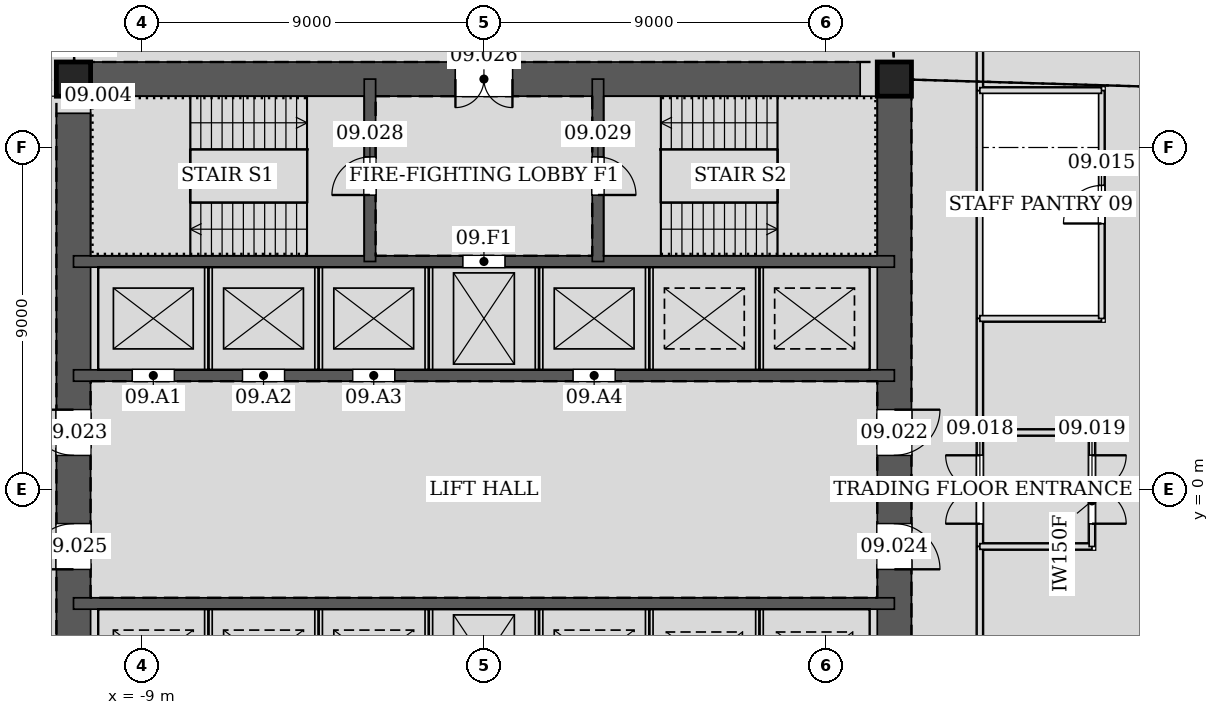
"""IFC4 building model, lengths in metres.
Left out: names, types, materials, properties, quantities, classifications, styles, units other than length and angle.
Written with IfcOpenShell. Run it as: python <this file> out.ifc"""

import sys

from ifc_helpers import new_model, si_unit, direction, frame, frame_2d, origin, origin_2d, place, context, subcontext, project, spatial, rectangle, hollow_rectangle, extrude, element, fill, save


model = new_model("IFC4")
c1 = context("Model", 3, precision=1e-05, world=origin(), true_north=direction((0.0, 1.0)))
c2 = subcontext(c1, "Body", "Model", "MODEL_VIEW")
j1 = project(units=[si_unit("LENGTHUNIT", "METRE"), si_unit("PLANEANGLEUNIT", "RADIAN")], contexts=[c1])
p1 = place(None, origin())
s1 = spatial("IfcSite", under=j1, at=p1, CompositionType="ELEMENT")
p2 = place(p1, origin())
s2 = spatial("IfcBuilding", under=s1, at=p2, CompositionType="ELEMENT")
p3 = place(p2, frame((0.0, 0.0, 45.6)))
s3 = spatial("IfcBuildingStorey", under=s2, at=p3, CompositionType="ELEMENT", Elevation=45.6)
for number, where, z_axis, x_axis in (
    (1, (10.8, 10.8, 0.0), (0.0, 0.0, 1.0), (1.0, 0.0, 0.0)),
    (2, (-10.8, 10.8, 0.0), (0.0, 0.0, 1.0), (1.0, 0.0, 0.0)),
):
    element("IfcColumn", number, at=place(p3, frame(where, z_axis=z_axis, x_axis=x_axis)), inside=s3, PredefinedType="COLUMN", context=c2, shape_type="SweptSolid", body=[
        extrude(hollow_rectangle(XDim=0.9, YDim=0.9, WallThickness=0.06, at=origin_2d()), origin(), (0.0, 0.0, 1.0), 4.2),
    ])
p4 = place(p3, frame((10.8, -10.8, 0.0), z_axis=(0.0, 0.0, 1.0), x_axis=(0.0, 1.0, 0.0)))
e3 = element("IfcWall", 3, at=p4, inside=s3, PredefinedType="SOLIDWALL", context=c2, shape_type="SweptSolid", body=[
    extrude(rectangle(XDim=21.6, YDim=0.9, at=frame_2d((10.8, 0.0))), origin(), (0.0, 0.0, 1.0), 4.2),
])
p5 = place(p4, frame((11.7, 0.0, 0.0)))
e4 = element("IfcOpeningElement", 4, at=p5, cuts=e3, PredefinedType="OPENING", context=c2, shape_type="SweptSolid", body=[
    extrude(rectangle(XDim=1.2, YDim=2.1, at=frame_2d((0.6, 1.05))), frame((0.0, 0.46, 0.0), z_axis=(0.0, -1.0, 0.0), x_axis=(1.0, 0.0, 0.0)), (0.0, 0.0, 1.0), 0.92),
])
p6 = place(p4, frame((8.7, 0.0, 0.0)))
e5 = element("IfcOpeningElement", 5, at=p6, cuts=e3, PredefinedType="OPENING", context=c2, shape_type="SweptSolid", body=[
    extrude(rectangle(XDim=1.2, YDim=2.1, at=frame_2d((0.6, 1.05))), frame((0.0, 0.46, 0.0), z_axis=(0.0, -1.0, 0.0), x_axis=(1.0, 0.0, 0.0)), (0.0, 0.0, 1.0), 0.92),
])
p7 = place(p3, frame((10.8, 10.8, 0.0), z_axis=(0.0, 0.0, 1.0), x_axis=(-1.0, 0.0, 0.0)))
e6 = element("IfcWall", 6, at=p7, inside=s3, PredefinedType="SOLIDWALL", context=c2, shape_type="SweptSolid", body=[
    extrude(rectangle(XDim=21.6, YDim=0.9, at=frame_2d((10.8, 0.0))), origin(), (0.0, 0.0, 1.0), 4.2),
])
p8 = place(p7, frame((10.05, 0.0, 0.0)))
e7 = element("IfcOpeningElement", 7, at=p8, cuts=e6, PredefinedType="OPENING", context=c2, shape_type="SweptSolid", body=[
    extrude(rectangle(XDim=1.5, YDim=2.1, at=frame_2d((0.75, 1.05))), frame((0.0, 0.46, 0.0), z_axis=(0.0, -1.0, 0.0), x_axis=(1.0, 0.0, 0.0)), (0.0, 0.0, 1.0), 0.92),
])
p9 = place(p3, frame((-10.8, 10.8, 0.0), z_axis=(0.0, 0.0, 1.0), x_axis=(0.0, -1.0, 0.0)))
e8 = element("IfcWall", 8, at=p9, inside=s3, PredefinedType="SOLIDWALL", context=c2, shape_type="SweptSolid", body=[
    extrude(rectangle(XDim=21.6, YDim=0.9, at=frame_2d((10.8, 0.0))), origin(), (0.0, 0.0, 1.0), 4.2),
])
p10 = place(p9, frame((8.7, 0.0, 0.0)))
e9 = element("IfcOpeningElement", 9, at=p10, cuts=e8, PredefinedType="OPENING", context=c2, shape_type="SweptSolid", body=[
    extrude(rectangle(XDim=1.2, YDim=2.1, at=frame_2d((0.6, 1.05))), frame((0.0, 0.46, 0.0), z_axis=(0.0, -1.0, 0.0), x_axis=(1.0, 0.0, 0.0)), (0.0, 0.0, 1.0), 0.92),
])
p11 = place(p9, frame((11.7, 0.0, 0.0)))
e10 = element("IfcOpeningElement", 10, at=p11, cuts=e8, PredefinedType="OPENING", context=c2, shape_type="SweptSolid", body=[
    extrude(rectangle(XDim=1.2, YDim=2.1, at=frame_2d((0.6, 1.05))), frame((0.0, 0.46, 0.0), z_axis=(0.0, -1.0, 0.0), x_axis=(1.0, 0.0, 0.0)), (0.0, 0.0, 1.0), 0.92),
])
p12 = place(p3, frame((-10.8, 3.0, 0.0), z_axis=(0.0, 0.0, 1.0), x_axis=(1.0, 0.0, 0.0)))
e11 = element("IfcWall", 11, at=p12, inside=s3, PredefinedType="SOLIDWALL", context=c2, shape_type="SweptSolid", body=[
    extrude(rectangle(XDim=21.6, YDim=0.3, at=frame_2d((10.8, 0.0))), origin(), (0.0, 0.0, 1.0), 4.2),
])
p13 = place(p12, frame((1.55, 0.0, 0.0)))
e12 = element("IfcOpeningElement", 12, at=p13, cuts=e11, PredefinedType="OPENING", context=c2, shape_type="SweptSolid", body=[
    extrude(rectangle(XDim=1.1, YDim=2.1, at=frame_2d((0.55, 1.05))), frame((0.0, 0.16, 0.0), z_axis=(0.0, -1.0, 0.0), x_axis=(1.0, 0.0, 0.0)), (0.0, 0.0, 1.0), 0.32),
])
p14 = place(p12, frame((4.45, 0.0, 0.0)))
e13 = element("IfcOpeningElement", 13, at=p14, cuts=e11, PredefinedType="OPENING", context=c2, shape_type="SweptSolid", body=[
    extrude(rectangle(XDim=1.1, YDim=2.1, at=frame_2d((0.55, 1.05))), frame((0.0, 0.16, 0.0), z_axis=(0.0, -1.0, 0.0), x_axis=(1.0, 0.0, 0.0)), (0.0, 0.0, 1.0), 0.32),
])
p15 = place(p12, frame((7.35, 0.0, 0.0)))
e14 = element("IfcOpeningElement", 14, at=p15, cuts=e11, PredefinedType="OPENING", context=c2, shape_type="SweptSolid", body=[
    extrude(rectangle(XDim=1.1, YDim=2.1, at=frame_2d((0.55, 1.05))), frame((0.0, 0.16, 0.0), z_axis=(0.0, -1.0, 0.0), x_axis=(1.0, 0.0, 0.0)), (0.0, 0.0, 1.0), 0.32),
])
p16 = place(p12, frame((13.15, 0.0, 0.0)))
e15 = element("IfcOpeningElement", 15, at=p16, cuts=e11, PredefinedType="OPENING", context=c2, shape_type="SweptSolid", body=[
    extrude(rectangle(XDim=1.1, YDim=2.1, at=frame_2d((0.55, 1.05))), frame((0.0, 0.16, 0.0), z_axis=(0.0, -1.0, 0.0), x_axis=(1.0, 0.0, 0.0)), (0.0, 0.0, 1.0), 0.32),
])
p17 = place(p3, frame((-10.8, 6.0, 0.0), z_axis=(0.0, 0.0, 1.0), x_axis=(1.0, 0.0, 0.0)))
e16 = element("IfcWall", 16, at=p17, inside=s3, PredefinedType="SOLIDWALL", context=c2, shape_type="SweptSolid", body=[
    extrude(rectangle(XDim=21.6, YDim=0.3, at=frame_2d((10.8, 0.0))), origin(), (0.0, 0.0, 1.0), 4.2),
])
p18 = place(p17, frame((10.25, 0.0, 0.0)))
e17 = element("IfcOpeningElement", 17, at=p18, cuts=e16, PredefinedType="OPENING", context=c2, shape_type="SweptSolid", body=[
    extrude(rectangle(XDim=1.1, YDim=2.1, at=frame_2d((0.55, 1.05))), frame((0.0, 0.16, 0.0), z_axis=(0.0, -1.0, 0.0), x_axis=(1.0, 0.0, 0.0)), (0.0, 0.0, 1.0), 0.32),
])
p19 = place(p3, frame((-3.0, 6.0, 0.0), z_axis=(0.0, 0.0, 1.0), x_axis=(0.0, 1.0, 0.0)))
e18 = element("IfcWall", 18, at=p19, inside=s3, PredefinedType="SOLIDWALL", context=c2, shape_type="SweptSolid", body=[
    extrude(rectangle(XDim=4.8, YDim=0.3, at=frame_2d((2.4, 0.0))), origin(), (0.0, 0.0, 1.0), 4.2),
])
p20 = place(p19, frame((1.75, 0.0, 0.0)))
e19 = element("IfcOpeningElement", 19, at=p20, cuts=e18, PredefinedType="OPENING", context=c2, shape_type="SweptSolid", body=[
    extrude(rectangle(XDim=1.0, YDim=2.1, at=frame_2d((0.5, 1.05))), frame((0.0, 0.16, 0.0), z_axis=(0.0, -1.0, 0.0), x_axis=(1.0, 0.0, 0.0)), (0.0, 0.0, 1.0), 0.32),
])
p21 = place(p3, frame((3.0, 6.0, 0.0), z_axis=(0.0, 0.0, 1.0), x_axis=(0.0, 1.0, 0.0)))
e20 = element("IfcWall", 20, at=p21, inside=s3, PredefinedType="SOLIDWALL", context=c2, shape_type="SweptSolid", body=[
    extrude(rectangle(XDim=4.8, YDim=0.3, at=frame_2d((2.4, 0.0))), origin(), (0.0, 0.0, 1.0), 4.2),
])
p22 = place(p21, frame((1.75, 0.0, 0.0)))
e21 = element("IfcOpeningElement", 21, at=p22, cuts=e20, PredefinedType="OPENING", context=c2, shape_type="SweptSolid", body=[
    extrude(rectangle(XDim=1.0, YDim=2.1, at=frame_2d((0.5, 1.05))), frame((0.0, 0.16, 0.0), z_axis=(0.0, -1.0, 0.0), x_axis=(1.0, 0.0, 0.0)), (0.0, 0.0, 1.0), 0.32),
])
p23 = place(p3, frame((-10.8, -3.0, 0.0), z_axis=(0.0, 0.0, 1.0), x_axis=(1.0, 0.0, 0.0)))
e22 = element("IfcWall", 22, at=p23, inside=s3, PredefinedType="SOLIDWALL", context=c2, shape_type="SweptSolid", body=[
    extrude(rectangle(XDim=21.6, YDim=0.3, at=frame_2d((10.8, 0.0))), origin(), (0.0, 0.0, 1.0), 4.2),
])
p24 = place(p3, frame((13.05, 4.499, 0.0), z_axis=(0.0, 0.0, 1.0), x_axis=(0.0, 1.0, 0.0)))
e23 = element("IfcWall", 23, at=p24, inside=s3, PredefinedType="PARTITIONING", context=c2, shape_type="SweptSolid", body=[
    extrude(rectangle(XDim=6.002, YDim=0.15, at=frame_2d((3.001, 0.0))), origin(), (0.0, 0.0, 1.0), 4.035),
])
p25 = place(p3, frame((13.05, -1.501, 0.0), z_axis=(0.0, 0.0, 1.0), x_axis=(0.0, 1.0, 0.0)))
e24 = element("IfcWall", 24, at=p25, inside=s3, PredefinedType="PARTITIONING", context=c2, shape_type="SweptSolid", body=[
    extrude(rectangle(XDim=3.002, YDim=0.15, at=frame_2d((1.501, 0.0))), origin(), (0.0, 0.0, 1.0), 2.983),
])
p26 = place(p25, frame((0.601, 0.0, 0.0)))
e25 = element("IfcOpeningElement", 25, at=p26, cuts=e24, PredefinedType="OPENING", context=c2, shape_type="SweptSolid", body=[
    extrude(rectangle(XDim=1.8, YDim=2.4, at=frame_2d((0.9, 1.2))), frame((0.0, 0.085, 0.0), z_axis=(0.0, -1.0, 0.0), x_axis=(1.0, 0.0, 0.0)), (0.0, 0.0, 1.0), 0.17),
])
p27 = place(p3, frame((13.05, 10.499, 0.0), z_axis=(0.0, 0.0, 1.0), x_axis=(0.0, 1.0, 0.0)))
e26 = element("IfcWall", 26, at=p27, inside=s3, PredefinedType="PARTITIONING", context=c2, shape_type="SweptSolid", body=[
    extrude(rectangle(XDim=2.551, YDim=0.15, at=frame_2d((1.275, 0.0))), origin(), (0.0, 0.0, 1.0), 3.014),
])
p28 = place(p3, frame((13.05, -13.05, 0.0), z_axis=(0.0, 0.0, 1.0), x_axis=(0.0, 1.0, 0.0)))
e27 = element("IfcWall", 27, at=p28, inside=s3, PredefinedType="PARTITIONING", context=c2, shape_type="SweptSolid", body=[
    extrude(rectangle(XDim=11.551, YDim=0.15, at=frame_2d((5.775, 0.0))), origin(), (0.0, 0.0, 1.0), 3.014),
])
p29 = place(p3, frame((13.05, 1.499, 0.0), z_axis=(0.0, 0.0, 1.0), x_axis=(0.0, 1.0, 0.0)))
e28 = element("IfcWall", 28, at=p29, inside=s3, PredefinedType="PARTITIONING", context=c2, shape_type="SweptSolid", body=[
    extrude(rectangle(XDim=3.002, YDim=0.15, at=frame_2d((1.501, 0.0))), origin(), (0.0, 0.0, 1.0), 4.035),
])
p30 = place(p3, frame((13.05, 4.5, 0.0), z_axis=(0.0, 0.0, 1.0), x_axis=(1.0, 0.0, 0.0)))
e29 = element("IfcWall", 29, at=p30, inside=s3, PredefinedType="PARTITIONING", context=c2, shape_type="SweptSolid", body=[
    extrude(rectangle(XDim=3.2, YDim=0.15, at=frame_2d((1.6, 0.0))), origin(), (0.0, 0.0, 1.0), 3.426),
])
p31 = place(p3, frame((16.25, 4.5, 0.0), z_axis=(0.0, 0.0, 1.0), x_axis=(0.0, 1.0, 0.0)))
e30 = element("IfcWall", 30, at=p31, inside=s3, PredefinedType="PARTITIONING", context=c2, shape_type="SweptSolid", body=[
    extrude(rectangle(XDim=6.0, YDim=0.15, at=frame_2d((3.0, 0.0))), origin(), (0.0, 0.0, 1.0), 3.014),
])
p32 = place(p31, frame((2.5, 0.0, 0.0)))
e31 = element("IfcOpeningElement", 31, at=p32, cuts=e30, PredefinedType="OPENING", context=c2, shape_type="SweptSolid", body=[
    extrude(rectangle(XDim=1.0, YDim=2.1, at=frame_2d((0.5, 1.05))), frame((0.0, 0.085, 0.0), z_axis=(0.0, -1.0, 0.0), x_axis=(1.0, 0.0, 0.0)), (0.0, 0.0, 1.0), 0.17),
])
p33 = place(p3, frame((16.25, 10.5, 0.0), z_axis=(0.0, 0.0, 1.0), x_axis=(-1.0, 0.0, 0.0)))
e32 = element("IfcWall", 32, at=p33, inside=s3, PredefinedType="PARTITIONING", context=c2, shape_type="SweptSolid", body=[
    extrude(rectangle(XDim=3.2, YDim=0.15, at=frame_2d((1.6, 0.0))), origin(), (0.0, 0.0, 1.0), 3.014),
])
p34 = place(p3, frame((13.05, -1.5, 0.0), z_axis=(0.0, 0.0, 1.0), x_axis=(1.0, 0.0, 0.0)))
e33 = element("IfcWall", 33, at=p34, inside=s3, PredefinedType="PARTITIONING", context=c2, shape_type="SweptSolid", body=[
    extrude(rectangle(XDim=2.95, YDim=0.15, at=frame_2d((1.475, 0.0))), origin(), (0.0, 0.0, 1.0), 3.426),
])
p35 = place(p3, frame((16.0, -1.5, 0.0), z_axis=(0.0, 0.0, 1.0), x_axis=(0.0, 1.0, 0.0)))
e34 = element("IfcWall", 34, at=p35, inside=s3, PredefinedType="PARTITIONING", context=c2, shape_type="SweptSolid", body=[
    extrude(rectangle(XDim=3.0, YDim=0.15, at=frame_2d((1.5, 0.0))), origin(), (0.0, 0.0, 1.0), 2.983),
])
p36 = place(p35, frame((0.6, 0.0, 0.0)))
e35 = element("IfcOpeningElement", 35, at=p36, cuts=e34, PredefinedType="OPENING", context=c2, shape_type="SweptSolid", body=[
    extrude(rectangle(XDim=1.8, YDim=2.4, at=frame_2d((0.9, 1.2))), frame((0.0, 0.085, 0.0), z_axis=(0.0, -1.0, 0.0), x_axis=(1.0, 0.0, 0.0)), (0.0, 0.0, 1.0), 0.17),
])
p37 = place(p3, frame((16.0, 1.5, 0.0), z_axis=(0.0, 0.0, 1.0), x_axis=(-1.0, 0.0, 0.0)))
e36 = element("IfcWall", 36, at=p37, inside=s3, PredefinedType="PARTITIONING", context=c2, shape_type="SweptSolid", body=[
    extrude(rectangle(XDim=2.95, YDim=0.15, at=frame_2d((1.475, 0.0))), origin(), (0.0, 0.0, 1.0), 3.426),
])
for number, where, z_axis, x_axis in (
    (37, (-7.25, 3.15, 0.0), (0.0, 0.0, 1.0), (0.0, 1.0, 0.0)),
    (38, (-4.35, 3.15, 0.0), (0.0, 0.0, 1.0), (0.0, 1.0, 0.0)),
    (39, (-1.45, 3.15, 0.0), (0.0, 0.0, 1.0), (0.0, 1.0, 0.0)),
    (40, (1.45, 3.15, 0.0), (0.0, 0.0, 1.0), (0.0, 1.0, 0.0)),
    (41, (4.35, 3.15, 0.0), (0.0, 0.0, 1.0), (0.0, 1.0, 0.0)),
    (42, (7.25, 3.15, 0.0), (0.0, 0.0, 1.0), (0.0, 1.0, 0.0)),
    (43, (-7.25, -5.85, 0.0), (0.0, 0.0, 1.0), (0.0, 1.0, 0.0)),
    (44, (-4.35, -5.85, 0.0), (0.0, 0.0, 1.0), (0.0, 1.0, 0.0)),
    (45, (-1.45, -5.85, 0.0), (0.0, 0.0, 1.0), (0.0, 1.0, 0.0)),
    (46, (1.45, -5.85, 0.0), (0.0, 0.0, 1.0), (0.0, 1.0, 0.0)),
    (47, (4.35, -5.85, 0.0), (0.0, 0.0, 1.0), (0.0, 1.0, 0.0)),
    (48, (7.25, -5.85, 0.0), (0.0, 0.0, 1.0), (0.0, 1.0, 0.0)),
):
    element("IfcWall", number, at=place(p3, frame(where, z_axis=z_axis, x_axis=x_axis)), inside=s3, PredefinedType="PARTITIONING", context=c2, shape_type="SweptSolid", body=[
        extrude(rectangle(XDim=2.7, YDim=0.2, at=frame_2d((1.35, 0.0))), origin(), (0.0, 0.0, 1.0), 4.2),
    ])
p38 = place(p32, origin())
e49 = element("IfcDoor", 49, at=p38, inside=s3, OperationType="SINGLE_SWING_LEFT", PredefinedType="DOOR", context=c2, shape_type="SweptSolid", body=[
    extrude(rectangle(XDim=1.0, YDim=2.1, at=frame_2d((0.5, 1.05))), frame((0.0, 0.025, 0.0), z_axis=(0.0, -1.0, 0.0), x_axis=(1.0, 0.0, 0.0)), (0.0, 0.0, 1.0), 0.05),
])
fill(e31, e49)
p39 = place(p26, origin())
e50 = element("IfcDoor", 50, at=p39, inside=s3, OperationType="DOUBLE_DOOR_SINGLE_SWING", PredefinedType="DOOR", context=c2, shape_type="SweptSolid", body=[
    extrude(rectangle(XDim=1.8, YDim=2.4, at=frame_2d((0.9, 1.2))), frame((0.0, 0.025, 0.0), z_axis=(0.0, -1.0, 0.0), x_axis=(1.0, 0.0, 0.0)), (0.0, 0.0, 1.0), 0.05),
])
fill(e25, e50)
p40 = place(p36, frame((1.8, 0.0, 0.0), z_axis=(0.0, 0.0, 1.0), x_axis=(-1.0, 0.0, 0.0)))
e51 = element("IfcDoor", 51, at=p40, inside=s3, OperationType="DOUBLE_DOOR_SINGLE_SWING", PredefinedType="DOOR", context=c2, shape_type="SweptSolid", body=[
    extrude(rectangle(XDim=1.8, YDim=2.4, at=frame_2d((0.9, 1.2))), frame((0.0, 0.025, 0.0), z_axis=(0.0, -1.0, 0.0), x_axis=(1.0, 0.0, 0.0)), (0.0, 0.0, 1.0), 0.05),
])
fill(e35, e51)
p41 = place(p5, frame((1.2, 0.0, 0.0), z_axis=(0.0, 0.0, 1.0), x_axis=(-1.0, 0.0, 0.0)))
e52 = element("IfcDoor", 52, at=p41, inside=s3, OperationType="SINGLE_SWING_LEFT", PredefinedType="DOOR", context=c2, shape_type="SweptSolid", body=[
    extrude(rectangle(XDim=1.2, YDim=2.1, at=frame_2d((0.6, 1.05))), frame((0.0, 0.025, 0.0), z_axis=(0.0, -1.0, 0.0), x_axis=(1.0, 0.0, 0.0)), (0.0, 0.0, 1.0), 0.05),
])
fill(e4, e52)
p42 = place(p10, frame((1.2, 0.0, 0.0), z_axis=(0.0, 0.0, 1.0), x_axis=(-1.0, 0.0, 0.0)))
e53 = element("IfcDoor", 53, at=p42, inside=s3, OperationType="SINGLE_SWING_RIGHT", PredefinedType="DOOR", context=c2, shape_type="SweptSolid", body=[
    extrude(rectangle(XDim=1.2, YDim=2.1, at=frame_2d((0.6, 1.05))), frame((0.0, 0.025, 0.0), z_axis=(0.0, -1.0, 0.0), x_axis=(1.0, 0.0, 0.0)), (0.0, 0.0, 1.0), 0.05),
])
fill(e9, e53)
p43 = place(p6, frame((1.2, 0.0, 0.0), z_axis=(0.0, 0.0, 1.0), x_axis=(-1.0, 0.0, 0.0)))
e54 = element("IfcDoor", 54, at=p43, inside=s3, OperationType="SINGLE_SWING_RIGHT", PredefinedType="DOOR", context=c2, shape_type="SweptSolid", body=[
    extrude(rectangle(XDim=1.2, YDim=2.1, at=frame_2d((0.6, 1.05))), frame((0.0, 0.025, 0.0), z_axis=(0.0, -1.0, 0.0), x_axis=(1.0, 0.0, 0.0)), (0.0, 0.0, 1.0), 0.05),
])
fill(e5, e54)
p44 = place(p11, frame((1.2, 0.0, 0.0), z_axis=(0.0, 0.0, 1.0), x_axis=(-1.0, 0.0, 0.0)))
e55 = element("IfcDoor", 55, at=p44, inside=s3, OperationType="SINGLE_SWING_LEFT", PredefinedType="DOOR", context=c2, shape_type="SweptSolid", body=[
    extrude(rectangle(XDim=1.2, YDim=2.1, at=frame_2d((0.6, 1.05))), frame((0.0, 0.025, 0.0), z_axis=(0.0, -1.0, 0.0), x_axis=(1.0, 0.0, 0.0)), (0.0, 0.0, 1.0), 0.05),
])
fill(e10, e55)
p45 = place(p8, origin())
e56 = element("IfcDoor", 56, at=p45, inside=s3, OperationType="DOUBLE_DOOR_SINGLE_SWING", PredefinedType="DOOR", context=c2, shape_type="SweptSolid", body=[
    extrude(rectangle(XDim=1.5, YDim=2.1, at=frame_2d((0.75, 1.05))), frame((0.0, 0.025, 0.0), z_axis=(0.0, -1.0, 0.0), x_axis=(1.0, 0.0, 0.0)), (0.0, 0.0, 1.0), 0.05),
])
fill(e7, e56)
p46 = place(p20, origin())
e57 = element("IfcDoor", 57, at=p46, inside=s3, OperationType="SINGLE_SWING_LEFT", PredefinedType="DOOR", context=c2, shape_type="SweptSolid", body=[
    extrude(rectangle(XDim=1.0, YDim=2.1, at=frame_2d((0.5, 1.05))), frame((0.0, 0.025, 0.0), z_axis=(0.0, -1.0, 0.0), x_axis=(1.0, 0.0, 0.0)), (0.0, 0.0, 1.0), 0.05),
])
fill(e19, e57)
p47 = place(p22, frame((1.0, 0.0, 0.0), z_axis=(0.0, 0.0, 1.0), x_axis=(-1.0, 0.0, 0.0)))
e58 = element("IfcDoor", 58, at=p47, inside=s3, OperationType="SINGLE_SWING_RIGHT", PredefinedType="DOOR", context=c2, shape_type="SweptSolid", body=[
    extrude(rectangle(XDim=1.0, YDim=2.1, at=frame_2d((0.5, 1.05))), frame((0.0, 0.025, 0.0), z_axis=(0.0, -1.0, 0.0), x_axis=(1.0, 0.0, 0.0)), (0.0, 0.0, 1.0), 0.05),
])
fill(e21, e58)
p48 = place(p13, origin())
e59 = element("IfcDoor", 59, at=p48, inside=s3, OperationType="DOUBLE_DOOR_SLIDING", PredefinedType="DOOR", context=c2, shape_type="SweptSolid", body=[
    extrude(rectangle(XDim=1.1, YDim=2.1, at=frame_2d((0.55, 1.05))), frame((0.0, 0.025, 0.0), z_axis=(0.0, -1.0, 0.0), x_axis=(1.0, 0.0, 0.0)), (0.0, 0.0, 1.0), 0.05),
])
fill(e12, e59)
p49 = place(p14, origin())
e60 = element("IfcDoor", 60, at=p49, inside=s3, OperationType="DOUBLE_DOOR_SLIDING", PredefinedType="DOOR", context=c2, shape_type="SweptSolid", body=[
    extrude(rectangle(XDim=1.1, YDim=2.1, at=frame_2d((0.55, 1.05))), frame((0.0, 0.025, 0.0), z_axis=(0.0, -1.0, 0.0), x_axis=(1.0, 0.0, 0.0)), (0.0, 0.0, 1.0), 0.05),
])
fill(e13, e60)
p50 = place(p15, origin())
e61 = element("IfcDoor", 61, at=p50, inside=s3, OperationType="DOUBLE_DOOR_SLIDING", PredefinedType="DOOR", context=c2, shape_type="SweptSolid", body=[
    extrude(rectangle(XDim=1.1, YDim=2.1, at=frame_2d((0.55, 1.05))), frame((0.0, 0.025, 0.0), z_axis=(0.0, -1.0, 0.0), x_axis=(1.0, 0.0, 0.0)), (0.0, 0.0, 1.0), 0.05),
])
fill(e14, e61)
p51 = place(p18, origin())
e62 = element("IfcDoor", 62, at=p51, inside=s3, OperationType="DOUBLE_DOOR_SLIDING", PredefinedType="DOOR", context=c2, shape_type="SweptSolid", body=[
    extrude(rectangle(XDim=1.1, YDim=2.1, at=frame_2d((0.55, 1.05))), frame((0.0, 0.025, 0.0), z_axis=(0.0, -1.0, 0.0), x_axis=(1.0, 0.0, 0.0)), (0.0, 0.0, 1.0), 0.05),
])
fill(e17, e62)
p52 = place(p16, origin())
e63 = element("IfcDoor", 63, at=p52, inside=s3, OperationType="DOUBLE_DOOR_SLIDING", PredefinedType="DOOR", context=c2, shape_type="SweptSolid", body=[
    extrude(rectangle(XDim=1.1, YDim=2.1, at=frame_2d((0.55, 1.05))), frame((0.0, 0.025, 0.0), z_axis=(0.0, -1.0, 0.0), x_axis=(1.0, 0.0, 0.0)), (0.0, 0.0, 1.0), 0.05),
])
fill(e15, e63)
save(model, sys.argv[1])
